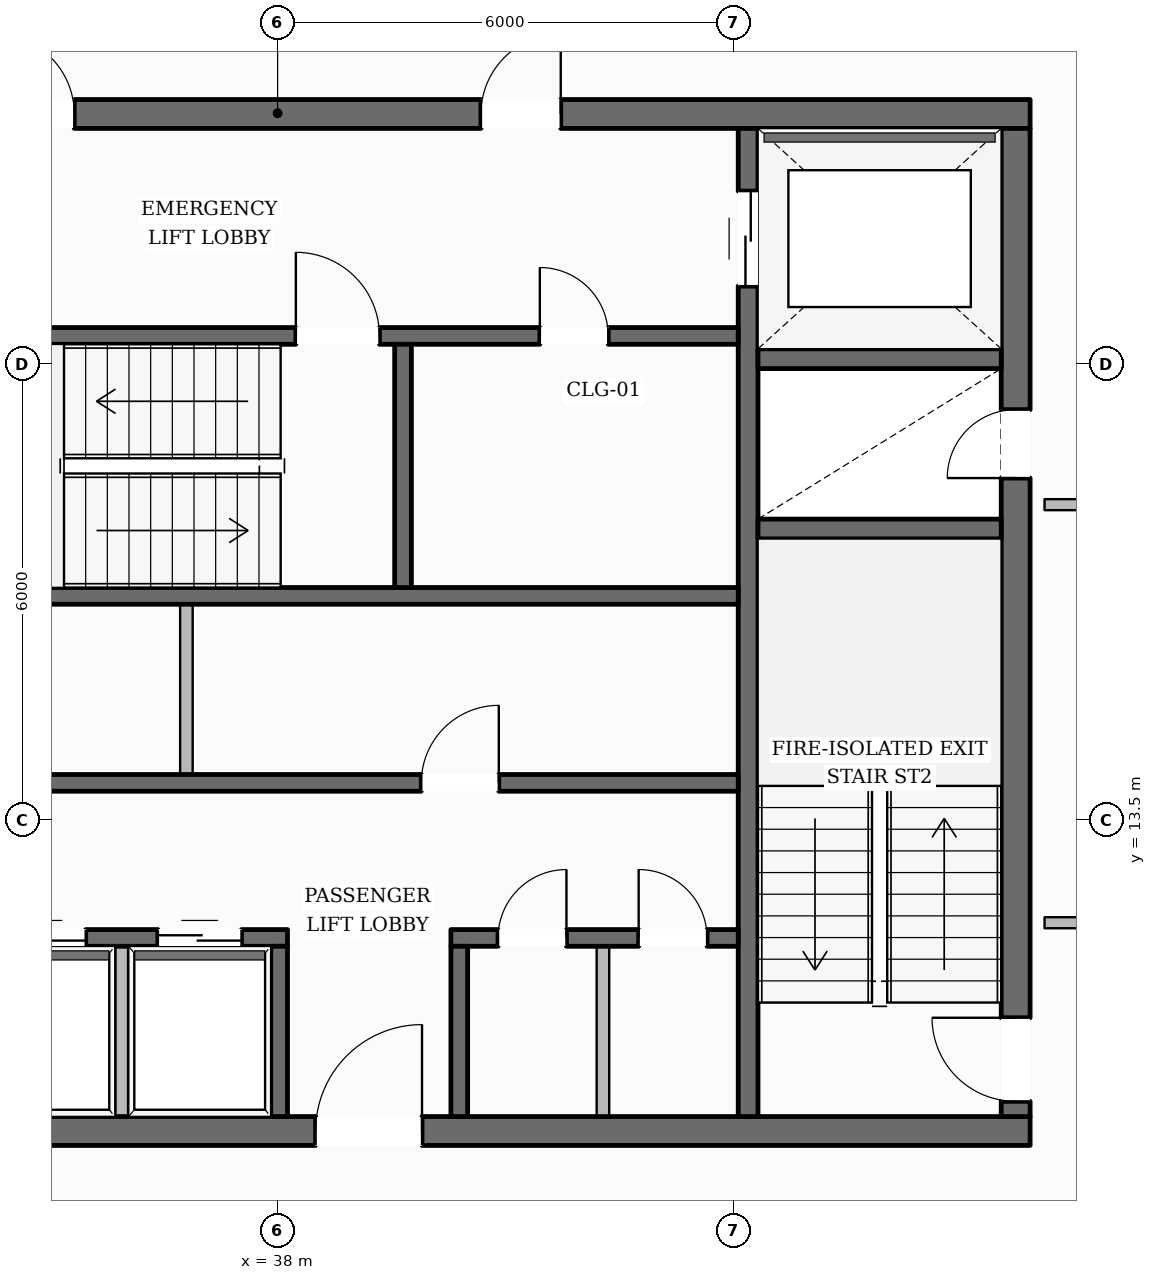
"""IFC4 building model, lengths in metres.
Left out: names, types, materials, properties, quantities, classifications, styles, units other than length and angle.
Written with IfcOpenShell. Run it as: python <this file> out.ifc"""

import sys

from ifc_helpers import new_model, si_unit, direction, frame, frame_2d, origin, place, context, subcontext, project, spatial, rectangle, extrude, element, fill, save


model = new_model("IFC4")
c1 = context("Model", 3, precision=1e-05, world=origin(), true_north=direction((0.0, 1.0)))
c2 = subcontext(c1, "Body", "Model", "MODEL_VIEW")
j1 = project(units=[si_unit("LENGTHUNIT", "METRE"), si_unit("PLANEANGLEUNIT", "RADIAN")], contexts=[c1])
p1 = place(None, origin())
s1 = spatial("IfcSite", under=j1, at=p1, CompositionType="ELEMENT")
p2 = place(p1, origin())
s2 = spatial("IfcBuilding", under=s1, at=p2, CompositionType="ELEMENT")
p3 = place(p2, frame((0.0, 0.0, 251.05)))
s3 = spatial("IfcBuildingStorey", under=s2, at=p3, CompositionType="ELEMENT", Elevation=251.05)
p4 = place(p3, frame((28.1, 9.41, 0.0), z_axis=(0.0, 0.0, 1.0), x_axis=(1.0, 0.0, 0.0)))
e1 = element("IfcWall", 1, at=p4, inside=s3, PredefinedType="SOLIDWALL", context=c2, shape_type="SweptSolid", body=[
    extrude(rectangle(XDim=19.8, YDim=0.38, at=frame_2d((9.9, 0.0))), origin(), (0.0, 0.0, 1.0), 3.61),
])
p5 = place(p4, frame((10.4, 0.0, 0.0)))
e2 = element("IfcOpeningElement", 2, at=p5, cuts=e1, PredefinedType="OPENING", context=c2, shape_type="SweptSolid", body=[
    extrude(rectangle(XDim=1.4, YDim=2.2, at=frame_2d((0.7, 1.1))), frame((0.0, 0.2, 0.0), z_axis=(0.0, -1.0, 0.0), x_axis=(1.0, 0.0, 0.0)), (0.0, 0.0, 1.0), 0.4),
])
p6 = place(p3, frame((28.1, 22.79, 0.0), z_axis=(0.0, 0.0, 1.0), x_axis=(1.0, 0.0, 0.0)))
e3 = element("IfcWall", 3, at=p6, inside=s3, PredefinedType="SOLIDWALL", context=c2, shape_type="SweptSolid", body=[
    extrude(rectangle(XDim=19.8, YDim=0.38, at=frame_2d((9.9, 0.0))), origin(), (0.0, 0.0, 1.0), 3.61),
])
p7 = place(p6, frame((6.175, 0.0, 0.0)))
e4 = element("IfcOpeningElement", 4, at=p7, cuts=e3, PredefinedType="OPENING", context=c2, shape_type="SweptSolid", body=[
    extrude(rectangle(XDim=1.05, YDim=2.15, at=frame_2d((0.525, 1.075))), frame((0.0, 0.2, 0.0), z_axis=(0.0, -1.0, 0.0), x_axis=(1.0, 0.0, 0.0)), (0.0, 0.0, 1.0), 0.4),
])
p8 = place(p6, frame((12.575, 0.0, 0.0)))
e5 = element("IfcOpeningElement", 5, at=p8, cuts=e3, PredefinedType="OPENING", context=c2, shape_type="SweptSolid", body=[
    extrude(rectangle(XDim=1.05, YDim=2.15, at=frame_2d((0.525, 1.075))), frame((0.0, 0.2, 0.0), z_axis=(0.0, -1.0, 0.0), x_axis=(1.0, 0.0, 0.0)), (0.0, 0.0, 1.0), 0.4),
])
p9 = place(p3, frame((47.71, 9.6, 0.0), z_axis=(0.0, 0.0, 1.0), x_axis=(0.0, 1.0, 0.0)))
e6 = element("IfcWall", 6, at=p9, inside=s3, PredefinedType="SOLIDWALL", context=c2, shape_type="SweptSolid", body=[
    extrude(rectangle(XDim=13.0, YDim=0.38, at=frame_2d((6.5, 0.0))), origin(), (0.0, 0.0, 1.0), 3.61),
])
p10 = place(p9, frame((0.2, 0.0, 0.0)))
e7 = element("IfcOpeningElement", 7, at=p10, cuts=e6, PredefinedType="OPENING", context=c2, shape_type="SweptSolid", body=[
    extrude(rectangle(XDim=1.1, YDim=2.15, at=frame_2d((0.55, 1.075))), frame((0.0, 0.2, 0.0), z_axis=(0.0, -1.0, 0.0), x_axis=(1.0, 0.0, 0.0)), (0.0, 0.0, 1.0), 0.4),
])
p11 = place(p9, frame((8.4, 0.0, 0.0)))
e8 = element("IfcOpeningElement", 8, at=p11, cuts=e6, PredefinedType="OPENING", context=c2, shape_type="SweptSolid", body=[
    extrude(rectangle(XDim=0.9, YDim=2.1, at=frame_2d((0.45, 1.05))), frame((0.0, 0.2, 0.0), z_axis=(0.0, -1.0, 0.0), x_axis=(1.0, 0.0, 0.0)), (0.0, 0.0, 1.0), 0.4),
])
p12 = place(p3, frame((44.19, 9.6, 0.0), z_axis=(0.0, 0.0, 1.0), x_axis=(0.0, 1.0, 0.0)))
e9 = element("IfcWall", 9, at=p12, inside=s3, PredefinedType="SHEAR", context=c2, shape_type="SweptSolid", body=[
    extrude(rectangle(XDim=13.0, YDim=0.26, at=frame_2d((6.5, 0.0))), origin(), (0.0, 0.0, 1.0), 3.61),
])
p13 = place(p12, frame((10.925, 0.0, 0.0)))
e10 = element("IfcOpeningElement", 10, at=p13, cuts=e9, PredefinedType="OPENING", context=c2, shape_type="SweptSolid", body=[
    extrude(rectangle(XDim=1.25, YDim=2.25, at=frame_2d((0.625, 1.125))), frame((0.0, 0.14, 0.0), z_axis=(0.0, -1.0, 0.0), x_axis=(1.0, 0.0, 0.0)), (0.0, 0.0, 1.0), 0.28),
])
for number, where, z_axis, x_axis in (
    (11, (44.32, 17.33, 0.0), (0.0, 0.0, 1.0), (1.0, 0.0, 0.0)),
    (12, (44.32, 19.57, 0.0), (0.0, 0.0, 1.0), (1.0, 0.0, 0.0)),
):
    element("IfcWall", number, at=place(p3, frame(where, z_axis=z_axis, x_axis=x_axis)), inside=s3, PredefinedType="SHEAR", context=c2, shape_type="SweptSolid", body=[
        extrude(rectangle(XDim=3.2, YDim=0.26, at=frame_2d((1.6, 0.0))), origin(), (0.0, 0.0, 1.0), 3.61),
    ])
p14 = place(p3, frame((31.94, 19.87, 0.0), z_axis=(0.0, 0.0, 1.0), x_axis=(1.0, 0.0, 0.0)))
e13 = element("IfcWall", 13, at=p14, inside=s3, PredefinedType="SOLIDWALL", context=c2, shape_type="SweptSolid", body=[
    extrude(rectangle(XDim=12.12, YDim=0.22, at=frame_2d((6.06, 0.0))), origin(), (0.0, 0.0, 1.0), 3.61),
])
p15 = place(p14, frame((6.3, 0.0, 0.0)))
e14 = element("IfcOpeningElement", 14, at=p15, cuts=e13, PredefinedType="OPENING", context=c2, shape_type="SweptSolid", body=[
    extrude(rectangle(XDim=1.1, YDim=2.15, at=frame_2d((0.55, 1.075))), frame((0.0, 0.12, 0.0), z_axis=(0.0, -1.0, 0.0), x_axis=(1.0, 0.0, 0.0)), (0.0, 0.0, 1.0), 0.24),
])
p16 = place(p14, frame((9.51, 0.0, 0.0)))
e15 = element("IfcOpeningElement", 15, at=p16, cuts=e13, PredefinedType="OPENING", context=c2, shape_type="SweptSolid", body=[
    extrude(rectangle(XDim=0.9, YDim=2.1, at=frame_2d((0.45, 1.05))), frame((0.0, 0.12, 0.0), z_axis=(0.0, -1.0, 0.0), x_axis=(1.0, 0.0, 0.0)), (0.0, 0.0, 1.0), 0.24),
])
p17 = place(p3, frame((31.94, 16.45, 0.0), z_axis=(0.0, 0.0, 1.0), x_axis=(1.0, 0.0, 0.0)))
e16 = element("IfcWall", 16, at=p17, inside=s3, PredefinedType="SOLIDWALL", context=c2, shape_type="SweptSolid", body=[
    extrude(rectangle(XDim=12.12, YDim=0.22, at=frame_2d((6.06, 0.0))), origin(), (0.0, 0.0, 1.0), 3.61),
])
p18 = place(p3, frame((39.65, 16.56, 0.0), z_axis=(0.0, 0.0, 1.0), x_axis=(0.0, 1.0, 0.0)))
e17 = element("IfcWall", 17, at=p18, inside=s3, PredefinedType="SOLIDWALL", context=c2, shape_type="SweptSolid", body=[
    extrude(rectangle(XDim=3.2, YDim=0.22, at=frame_2d((1.6, 0.0))), origin(), (0.0, 0.0, 1.0), 3.61),
])
p19 = place(p3, frame((31.94, 13.99, 0.0), z_axis=(0.0, 0.0, 1.0), x_axis=(1.0, 0.0, 0.0)))
e18 = element("IfcWall", 18, at=p19, inside=s3, PredefinedType="SOLIDWALL", context=c2, shape_type="SweptSolid", body=[
    extrude(rectangle(XDim=12.12, YDim=0.22, at=frame_2d((6.06, 0.0))), origin(), (0.0, 0.0, 1.0), 3.61),
])
p20 = place(p19, frame((1.91, 0.0, 0.0)))
e19 = element("IfcOpeningElement", 19, at=p20, cuts=e18, PredefinedType="OPENING", context=c2, shape_type="SweptSolid", body=[
    extrude(rectangle(XDim=0.9, YDim=2.1, at=frame_2d((0.45, 1.05))), frame((0.0, 0.12, 0.0), z_axis=(0.0, -1.0, 0.0), x_axis=(1.0, 0.0, 0.0)), (0.0, 0.0, 1.0), 0.24),
])
p21 = place(p19, frame((7.95, 0.0, 0.0)))
e20 = element("IfcOpeningElement", 20, at=p21, cuts=e18, PredefinedType="OPENING", context=c2, shape_type="SweptSolid", body=[
    extrude(rectangle(XDim=1.02, YDim=2.15, at=frame_2d((0.51, 1.075))), frame((0.0, 0.12, 0.0), z_axis=(0.0, -1.0, 0.0), x_axis=(1.0, 0.0, 0.0)), (0.0, 0.0, 1.0), 0.24),
])
p22 = place(p3, frame((31.94, 11.95, 0.0), z_axis=(0.0, 0.0, 1.0), x_axis=(1.0, 0.0, 0.0)))
e21 = element("IfcWall", 21, at=p22, inside=s3, PredefinedType="SOLIDWALL", context=c2, shape_type="SweptSolid", body=[
    extrude(rectangle(XDim=6.19, YDim=0.22, at=frame_2d((3.095, 0.0))), origin(), (0.0, 0.0, 1.0), 3.61),
])
p23 = place(p22, frame((0.385, 0.0, 0.0)))
e22 = element("IfcOpeningElement", 22, at=p23, cuts=e21, PredefinedType="OPENING", context=c2, shape_type="SweptSolid", body=[
    extrude(rectangle(XDim=1.1, YDim=2.2, at=frame_2d((0.55, 1.1))), frame((0.0, 0.12, 0.0), z_axis=(0.0, -1.0, 0.0), x_axis=(1.0, 0.0, 0.0)), (0.0, 0.0, 1.0), 0.24),
])
p24 = place(p22, frame((2.435, 0.0, 0.0)))
e23 = element("IfcOpeningElement", 23, at=p24, cuts=e21, PredefinedType="OPENING", context=c2, shape_type="SweptSolid", body=[
    extrude(rectangle(XDim=1.1, YDim=2.2, at=frame_2d((0.55, 1.1))), frame((0.0, 0.12, 0.0), z_axis=(0.0, -1.0, 0.0), x_axis=(1.0, 0.0, 0.0)), (0.0, 0.0, 1.0), 0.24),
])
p25 = place(p22, frame((4.485, 0.0, 0.0)))
e24 = element("IfcOpeningElement", 24, at=p25, cuts=e21, PredefinedType="OPENING", context=c2, shape_type="SweptSolid", body=[
    extrude(rectangle(XDim=1.1, YDim=2.2, at=frame_2d((0.55, 1.1))), frame((0.0, 0.12, 0.0), z_axis=(0.0, -1.0, 0.0), x_axis=(1.0, 0.0, 0.0)), (0.0, 0.0, 1.0), 0.24),
])
p26 = place(p3, frame((40.28, 11.95, 0.0), z_axis=(0.0, 0.0, 1.0), x_axis=(1.0, 0.0, 0.0)))
e25 = element("IfcWall", 25, at=p26, inside=s3, PredefinedType="SOLIDWALL", context=c2, shape_type="SweptSolid", body=[
    extrude(rectangle(XDim=3.78, YDim=0.22, at=frame_2d((1.89, 0.0))), origin(), (0.0, 0.0, 1.0), 3.61),
])
p27 = place(p26, frame((0.62, 0.0, 0.0)))
e26 = element("IfcOpeningElement", 26, at=p27, cuts=e25, PredefinedType="OPENING", context=c2, shape_type="SweptSolid", body=[
    extrude(rectangle(XDim=0.9, YDim=2.1, at=frame_2d((0.45, 1.05))), frame((0.0, 0.12, 0.0), z_axis=(0.0, -1.0, 0.0), x_axis=(1.0, 0.0, 0.0)), (0.0, 0.0, 1.0), 0.24),
])
p28 = place(p26, frame((2.47, 0.0, 0.0)))
e27 = element("IfcOpeningElement", 27, at=p28, cuts=e25, PredefinedType="OPENING", context=c2, shape_type="SweptSolid", body=[
    extrude(rectangle(XDim=0.9, YDim=2.1, at=frame_2d((0.45, 1.05))), frame((0.0, 0.12, 0.0), z_axis=(0.0, -1.0, 0.0), x_axis=(1.0, 0.0, 0.0)), (0.0, 0.0, 1.0), 0.24),
])
for number, where, z_axis, x_axis in (
    (28, (38.02, 9.6, 0.0), (0.0, 0.0, 1.0), (0.0, 1.0, 0.0)),
    (29, (40.39, 9.6, 0.0), (0.0, 0.0, 1.0), (0.0, 1.0, 0.0)),
):
    element("IfcWall", number, at=place(p3, frame(where, z_axis=z_axis, x_axis=x_axis)), inside=s3, PredefinedType="SOLIDWALL", context=c2, shape_type="SweptSolid", body=[
        extrude(rectangle(XDim=2.24, YDim=0.22, at=frame_2d((1.12, 0.0))), origin(), (0.0, 0.0, 1.0), 3.61),
    ])
p29 = place(p3, frame((41.284, 43.76, 0.0), z_axis=(0.0, 0.0, 1.0), x_axis=(0.50479404613, -0.863239810824, 0.0)))
e30 = element("IfcWall", 30, at=p29, inside=s3, PredefinedType="STANDARD", context=c2, shape_type="SweptSolid", body=[
    extrude(rectangle(XDim=38.372, YDim=0.35, at=frame_2d((19.186, 0.0))), origin(), (0.0, 0.0, 1.0), 3.196),
])
p30 = place(p29, frame((34.102, 0.0, 0.65)))
e31 = element("IfcOpeningElement", 31, at=p30, cuts=e30, PredefinedType="OPENING", context=c2, shape_type="SweptSolid", body=[
    extrude(rectangle(XDim=1.35, YDim=1.75, at=frame_2d((0.675, 0.875))), frame((0.0, 0.185, 0.0), z_axis=(0.0, -1.0, 0.0), x_axis=(1.0, 0.0, 0.0)), (0.0, 0.0, 1.0), 0.37),
])
p31 = place(p29, frame((27.864, 0.0, 0.65)))
e32 = element("IfcOpeningElement", 32, at=p31, cuts=e30, PredefinedType="OPENING", context=c2, shape_type="SweptSolid", body=[
    extrude(rectangle(XDim=1.35, YDim=1.75, at=frame_2d((0.675, 0.875))), frame((0.0, 0.185, 0.0), z_axis=(0.0, -1.0, 0.0), x_axis=(1.0, 0.0, 0.0)), (0.0, 0.0, 1.0), 0.37),
])
p32 = place(p29, frame((15.39, 0.0, 0.65)))
e33 = element("IfcOpeningElement", 33, at=p32, cuts=e30, PredefinedType="OPENING", context=c2, shape_type="SweptSolid", body=[
    extrude(rectangle(XDim=1.35, YDim=1.75, at=frame_2d((0.675, 0.875))), frame((0.0, 0.185, 0.0), z_axis=(0.0, -1.0, 0.0), x_axis=(1.0, 0.0, 0.0)), (0.0, 0.0, 1.0), 0.37),
])
p33 = place(p29, frame((9.153, 0.0, 0.65)))
e34 = element("IfcOpeningElement", 34, at=p33, cuts=e30, PredefinedType="OPENING", context=c2, shape_type="SweptSolid", body=[
    extrude(rectangle(XDim=1.35, YDim=1.75, at=frame_2d((0.675, 0.875))), frame((0.0, 0.185, 0.0), z_axis=(0.0, -1.0, 0.0), x_axis=(1.0, 0.0, 0.0)), (0.0, 0.0, 1.0), 0.37),
])
p34 = place(p29, frame((2.915, 0.0, 0.65)))
e35 = element("IfcOpeningElement", 35, at=p34, cuts=e30, PredefinedType="OPENING", context=c2, shape_type="SweptSolid", body=[
    extrude(rectangle(XDim=1.35, YDim=1.75, at=frame_2d((0.675, 0.875))), frame((0.0, 0.185, 0.0), z_axis=(0.0, -1.0, 0.0), x_axis=(1.0, 0.0, 0.0)), (0.0, 0.0, 1.0), 0.37),
])
p35 = place(p3, frame((35.95, 9.49, 0.0), z_axis=(0.0, 0.0, 1.0), x_axis=(0.0, 1.0, 0.0)))
e36 = element("IfcWall", 36, at=p35, inside=s3, PredefinedType="PARTITIONING", context=c2, shape_type="SweptSolid", body=[
    extrude(rectangle(XDim=2.35, YDim=0.165, at=frame_2d((1.175, 0.0))), origin(), (0.0, 0.0, 1.0), 3.61),
])
p36 = place(p3, frame((36.8, 14.1, 0.0), z_axis=(0.0, 0.0, 1.0), x_axis=(0.0, 1.0, 0.0)))
e37 = element("IfcWall", 37, at=p36, inside=s3, PredefinedType="PARTITIONING", context=c2, shape_type="SweptSolid", body=[
    extrude(rectangle(XDim=2.24, YDim=0.165, at=frame_2d((1.12, 0.0))), origin(), (0.0, 0.0, 1.0), 3.61),
])
p37 = place(p3, frame((42.28, 9.49, 0.0), z_axis=(0.0, 0.0, 1.0), x_axis=(0.0, 1.0, 0.0)))
e38 = element("IfcWall", 38, at=p37, inside=s3, PredefinedType="PARTITIONING", context=c2, shape_type="SweptSolid", body=[
    extrude(rectangle(XDim=2.35, YDim=0.165, at=frame_2d((1.175, 0.0))), origin(), (0.0, 0.0, 1.0), 3.61),
])
for number, where, z_axis, x_axis in (
    (39, (49.91, 17.65, 0.0), (0.0, 0.0, 1.0), (-1.0, 0.0, 0.0)),
    (40, (48.09, 12.15, 0.0), (0.0, 0.0, 1.0), (1.0, 0.0, 0.0)),
):
    element("IfcWall", number, at=place(p3, frame(where, z_axis=z_axis, x_axis=x_axis)), inside=s3, PredefinedType="PARTITIONING", context=c2, shape_type="SweptSolid", body=[
        extrude(rectangle(XDim=1.82, YDim=0.145, at=frame_2d((0.91, 0.0))), origin(), (0.0, 0.0, 1.0), 3.61),
    ])
p38 = place(p10, origin())
e41 = element("IfcDoor", 41, at=p38, inside=s3, OperationType="SINGLE_SWING_RIGHT", PredefinedType="DOOR", context=c2, shape_type="SweptSolid", body=[
    extrude(rectangle(XDim=1.1, YDim=2.15, at=frame_2d((0.55, 1.075))), frame((0.0, 0.025, 0.0), z_axis=(0.0, -1.0, 0.0), x_axis=(1.0, 0.0, 0.0)), (0.0, 0.0, 1.0), 0.05),
])
fill(e7, e41)
p39 = place(p15, origin())
e42 = element("IfcDoor", 42, at=p39, inside=s3, OperationType="SINGLE_SWING_LEFT", PredefinedType="DOOR", context=c2, shape_type="SweptSolid", body=[
    extrude(rectangle(XDim=1.1, YDim=2.15, at=frame_2d((0.55, 1.075))), frame((0.0, 0.025, 0.0), z_axis=(0.0, -1.0, 0.0), x_axis=(1.0, 0.0, 0.0)), (0.0, 0.0, 1.0), 0.05),
])
fill(e14, e42)
p40 = place(p11, origin())
e43 = element("IfcDoor", 43, at=p40, inside=s3, OperationType="SINGLE_SWING_LEFT", PredefinedType="DOOR", context=c2, shape_type="SweptSolid", body=[
    extrude(rectangle(XDim=0.9, YDim=2.1, at=frame_2d((0.45, 1.05))), frame((0.0, 0.025, 0.0), z_axis=(0.0, -1.0, 0.0), x_axis=(1.0, 0.0, 0.0)), (0.0, 0.0, 1.0), 0.05),
])
fill(e8, e43)
p41 = place(p7, origin())
e44 = element("IfcDoor", 44, at=p41, inside=s3, OperationType="SINGLE_SWING_LEFT", PredefinedType="DOOR", context=c2, shape_type="SweptSolid", body=[
    extrude(rectangle(XDim=1.05, YDim=2.15, at=frame_2d((0.525, 1.075))), frame((0.0, 0.025, 0.0), z_axis=(0.0, -1.0, 0.0), x_axis=(1.0, 0.0, 0.0)), (0.0, 0.0, 1.0), 0.05),
])
fill(e4, e44)
p42 = place(p8, origin())
e45 = element("IfcDoor", 45, at=p42, inside=s3, OperationType="SINGLE_SWING_RIGHT", PredefinedType="DOOR", context=c2, shape_type="SweptSolid", body=[
    extrude(rectangle(XDim=1.05, YDim=2.15, at=frame_2d((0.525, 1.075))), frame((0.0, 0.025, 0.0), z_axis=(0.0, -1.0, 0.0), x_axis=(1.0, 0.0, 0.0)), (0.0, 0.0, 1.0), 0.05),
])
fill(e5, e45)
p43 = place(p13, origin())
e46 = element("IfcDoor", 46, at=p43, inside=s3, OperationType="DOUBLE_DOOR_SLIDING", PredefinedType="DOOR", context=c2, shape_type="SweptSolid", body=[
    extrude(rectangle(XDim=1.25, YDim=2.25, at=frame_2d((0.625, 1.125))), frame((0.0, 0.025, 0.0), z_axis=(0.0, -1.0, 0.0), x_axis=(1.0, 0.0, 0.0)), (0.0, 0.0, 1.0), 0.05),
])
fill(e10, e46)
p44 = place(p5, origin())
e47 = element("IfcDoor", 47, at=p44, inside=s3, OperationType="SINGLE_SWING_RIGHT", PredefinedType="DOOR", context=c2, shape_type="SweptSolid", body=[
    extrude(rectangle(XDim=1.4, YDim=2.2, at=frame_2d((0.7, 1.1))), frame((0.0, 0.025, 0.0), z_axis=(0.0, -1.0, 0.0), x_axis=(1.0, 0.0, 0.0)), (0.0, 0.0, 1.0), 0.05),
])
fill(e2, e47)
p45 = place(p24, origin())
e48 = element("IfcDoor", 48, at=p45, inside=s3, OperationType="DOUBLE_DOOR_SLIDING", PredefinedType="DOOR", context=c2, shape_type="SweptSolid", body=[
    extrude(rectangle(XDim=1.1, YDim=2.2, at=frame_2d((0.55, 1.1))), frame((0.0, 0.025, 0.0), z_axis=(0.0, -1.0, 0.0), x_axis=(1.0, 0.0, 0.0)), (0.0, 0.0, 1.0), 0.05),
])
fill(e23, e48)
p46 = place(p25, origin())
e49 = element("IfcDoor", 49, at=p46, inside=s3, OperationType="DOUBLE_DOOR_SLIDING", PredefinedType="DOOR", context=c2, shape_type="SweptSolid", body=[
    extrude(rectangle(XDim=1.1, YDim=2.2, at=frame_2d((0.55, 1.1))), frame((0.0, 0.025, 0.0), z_axis=(0.0, -1.0, 0.0), x_axis=(1.0, 0.0, 0.0)), (0.0, 0.0, 1.0), 0.05),
])
fill(e24, e49)
p47 = place(p21, origin())
e50 = element("IfcDoor", 50, at=p47, inside=s3, OperationType="SINGLE_SWING_RIGHT", PredefinedType="DOOR", context=c2, shape_type="SweptSolid", body=[
    extrude(rectangle(XDim=1.02, YDim=2.15, at=frame_2d((0.51, 1.075))), frame((0.0, 0.025, 0.0), z_axis=(0.0, -1.0, 0.0), x_axis=(1.0, 0.0, 0.0)), (0.0, 0.0, 1.0), 0.05),
])
fill(e20, e50)
p48 = place(p16, origin())
e51 = element("IfcDoor", 51, at=p48, inside=s3, OperationType="SINGLE_SWING_LEFT", PredefinedType="DOOR", context=c2, shape_type="SweptSolid", body=[
    extrude(rectangle(XDim=0.9, YDim=2.1, at=frame_2d((0.45, 1.05))), frame((0.0, 0.025, 0.0), z_axis=(0.0, -1.0, 0.0), x_axis=(1.0, 0.0, 0.0)), (0.0, 0.0, 1.0), 0.05),
])
fill(e15, e51)
p49 = place(p27, origin())
e52 = element("IfcDoor", 52, at=p49, inside=s3, OperationType="SINGLE_SWING_RIGHT", PredefinedType="DOOR", context=c2, shape_type="SweptSolid", body=[
    extrude(rectangle(XDim=0.9, YDim=2.1, at=frame_2d((0.45, 1.05))), frame((0.0, 0.025, 0.0), z_axis=(0.0, -1.0, 0.0), x_axis=(1.0, 0.0, 0.0)), (0.0, 0.0, 1.0), 0.05),
])
fill(e26, e52)
p50 = place(p28, origin())
e53 = element("IfcDoor", 53, at=p50, inside=s3, OperationType="SINGLE_SWING_LEFT", PredefinedType="DOOR", context=c2, shape_type="SweptSolid", body=[
    extrude(rectangle(XDim=0.9, YDim=2.1, at=frame_2d((0.45, 1.05))), frame((0.0, 0.025, 0.0), z_axis=(0.0, -1.0, 0.0), x_axis=(1.0, 0.0, 0.0)), (0.0, 0.0, 1.0), 0.05),
])
fill(e27, e53)
save(model, sys.argv[1])
